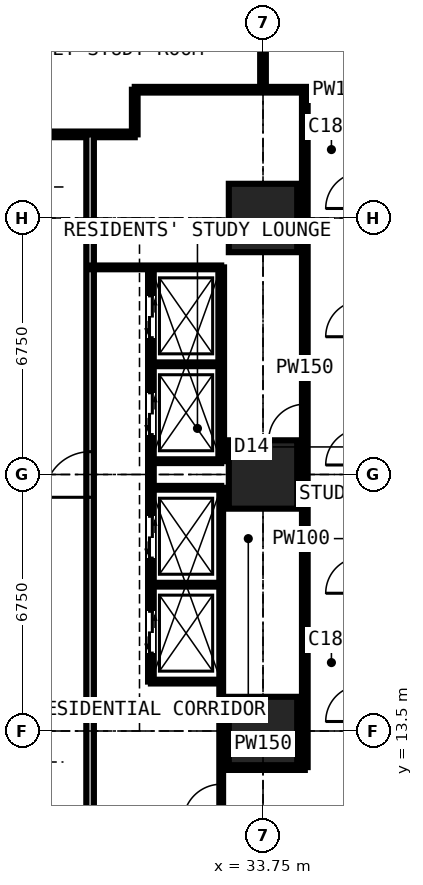
"""IFC4 building model, lengths in metres.
Left out: names, types, materials, properties, quantities, classifications, styles, units other than length and angle.
Written with IfcOpenShell. Run it as: python <this file> out.ifc"""

import sys

from ifc_helpers import new_model, si_unit, direction, frame, frame_2d, origin, origin_2d, place, context, subcontext, project, spatial, rectangle, extrude, element, fill, save


model = new_model("IFC4")
c1 = context("Model", 3, precision=1e-05, world=origin(), true_north=direction((0.0, 1.0)))
c2 = subcontext(c1, "Body", "Model", "MODEL_VIEW")
j1 = project(units=[si_unit("LENGTHUNIT", "METRE"), si_unit("PLANEANGLEUNIT", "RADIAN")], contexts=[c1])
p1 = place(None, origin())
s1 = spatial("IfcSite", under=j1, at=p1, CompositionType="ELEMENT")
p2 = place(p1, origin())
s2 = spatial("IfcBuilding", under=s1, at=p2, CompositionType="ELEMENT")
p3 = place(p2, frame((0.0, 0.0, 50.4)))
s3 = spatial("IfcBuildingStorey", under=s2, at=p3, CompositionType="ELEMENT", Elevation=50.4)
for number, where, z_axis, x_axis in (
    (1, (33.75, 13.5, 0.0), (0.0, 0.0, 1.0), (1.0, 0.0, 0.0)),
    (2, (33.75, 20.25, 0.0), (0.0, 0.0, 1.0), (1.0, 0.0, 0.0)),
    (3, (33.75, 27.0, 0.0), (0.0, 0.0, 1.0), (1.0, 0.0, 0.0)),
):
    element("IfcColumn", number, at=place(p3, frame(where, z_axis=z_axis, x_axis=x_axis)), inside=s3, PredefinedType="COLUMN", context=c2, shape_type="SweptSolid", body=[
        extrude(rectangle(XDim=1.8, YDim=1.8, at=origin_2d()), origin(), (0.0, 0.0, 1.0), 3.6),
    ])
p4 = place(p3, frame((11.3, 29.2, 0.0), z_axis=(0.0, 0.0, 1.0), x_axis=(1.0, 0.0, 0.0)))
e4 = element("IfcWall", 4, at=p4, inside=s3, PredefinedType="PARTITIONING", context=c2, shape_type="SweptSolid", body=[
    extrude(rectangle(XDim=19.075, YDim=0.15, at=frame_2d((9.538, 0.0))), origin(), (0.0, 0.0, 1.0), 3.375),
])
p5 = place(p4, frame((12.875, 0.0, 0.0)))
e5 = element("IfcOpeningElement", 5, at=p5, cuts=e4, PredefinedType="OPENING", context=c2, shape_type="SweptSolid", body=[
    extrude(rectangle(XDim=1.0, YDim=2.2, at=frame_2d((0.5, 1.1))), frame((0.0, 0.085, 0.0), z_axis=(0.0, -1.0, 0.0), x_axis=(1.0, 0.0, 0.0)), (0.0, 0.0, 1.0), 0.17),
])
p6 = place(p4, frame((10.438, 0.0, 0.0)))
e6 = element("IfcOpeningElement", 6, at=p6, cuts=e4, PredefinedType="OPENING", context=c2, shape_type="SweptSolid", body=[
    extrude(rectangle(XDim=1.0, YDim=2.2, at=frame_2d((0.5, 1.1))), frame((0.0, 0.085, 0.0), z_axis=(0.0, -1.0, 0.0), x_axis=(1.0, 0.0, 0.0)), (0.0, 0.0, 1.0), 0.17),
])
p7 = place(p4, frame((15.675, 0.0, 0.0)))
e7 = element("IfcOpeningElement", 7, at=p7, cuts=e4, PredefinedType="OPENING", context=c2, shape_type="SweptSolid", body=[
    extrude(rectangle(XDim=0.95, YDim=2.2, at=frame_2d((0.475, 1.1))), frame((0.0, 0.085, 0.0), z_axis=(0.0, -1.0, 0.0), x_axis=(1.0, 0.0, 0.0)), (0.0, 0.0, 1.0), 0.17),
])
p8 = place(p3, frame((29.2, 11.3, 0.0), z_axis=(0.0, 0.0, 1.0), x_axis=(0.0, 1.0, 0.0)))
e8 = element("IfcWall", 8, at=p8, inside=s3, PredefinedType="PARTITIONING", context=c2, shape_type="SweptSolid", body=[
    extrude(rectangle(XDim=17.9, YDim=0.2, at=frame_2d((8.95, 0.0))), origin(), (0.0, 0.0, 1.0), 3.375),
])
p9 = place(p8, frame((8.35, 0.0, 0.0)))
e9 = element("IfcOpeningElement", 9, at=p9, cuts=e8, PredefinedType="OPENING", context=c2, shape_type="SweptSolid", body=[
    extrude(rectangle(XDim=1.2, YDim=2.2, at=frame_2d((0.6, 1.1))), frame((0.0, 0.11, 0.0), z_axis=(0.0, -1.0, 0.0), x_axis=(1.0, 0.0, 0.0)), (0.0, 0.0, 1.0), 0.22),
])
p10 = place(p3, frame((29.2, 25.7, 0.0), z_axis=(0.0, 0.0, 1.0), x_axis=(1.0, 0.0, 0.0)))
e10 = element("IfcWall", 10, at=p10, inside=s3, PredefinedType="SHEAR", context=c2, shape_type="SweptSolid", body=[
    extrude(rectangle(XDim=3.45, YDim=0.1, at=frame_2d((1.725, 0.0))), origin(), (0.0, 0.0, 1.0), 3.375),
])
p11 = place(p3, frame((30.375, 29.2, 0.0), z_axis=(0.0, 0.0, 1.0), x_axis=(0.0, 1.0, 0.0)))
e11 = element("IfcWall", 11, at=p11, inside=s3, PredefinedType="PARTITIONING", context=c2, shape_type="SweptSolid", body=[
    extrude(rectangle(XDim=1.175, YDim=0.15, at=frame_2d((0.587, 0.0))), origin(), (0.0, 0.0, 1.0), 3.375),
])
p12 = place(p3, frame((30.375, 30.375, 0.0), z_axis=(0.0, 0.0, 1.0), x_axis=(1.0, 0.0, 0.0)))
e12 = element("IfcWall", 12, at=p12, inside=s3, PredefinedType="PARTITIONING", context=c2, shape_type="SweptSolid", body=[
    extrude(rectangle(XDim=10.859, YDim=0.15, at=frame_2d((5.429, 0.0))), origin(), (0.0, 0.0, 1.0), 3.375),
])
p13 = place(p3, frame((30.8, 14.8, 0.0), z_axis=(0.0, 0.0, 1.0), x_axis=(0.0, 1.0, 0.0)))
e13 = element("IfcWall", 13, at=p13, inside=s3, PredefinedType="PARTITIONING", context=c2, shape_type="SweptSolid", body=[
    extrude(rectangle(XDim=10.9, YDim=0.15, at=frame_2d((5.45, 0.0))), origin(), (0.0, 0.0, 1.0), 3.375),
])
p14 = place(p13, frame((0.75, 0.0, 0.0)))
e14 = element("IfcOpeningElement", 14, at=p14, cuts=e13, PredefinedType="OPENING", context=c2, shape_type="SweptSolid", body=[
    extrude(rectangle(XDim=1.1, YDim=2.2, at=frame_2d((0.55, 1.1))), frame((0.0, 0.085, 0.0), z_axis=(0.0, -1.0, 0.0), x_axis=(1.0, 0.0, 0.0)), (0.0, 0.0, 1.0), 0.17),
])
p15 = place(p13, frame((3.25, 0.0, 0.0)))
e15 = element("IfcOpeningElement", 15, at=p15, cuts=e13, PredefinedType="OPENING", context=c2, shape_type="SweptSolid", body=[
    extrude(rectangle(XDim=1.1, YDim=2.2, at=frame_2d((0.55, 1.1))), frame((0.0, 0.085, 0.0), z_axis=(0.0, -1.0, 0.0), x_axis=(1.0, 0.0, 0.0)), (0.0, 0.0, 1.0), 0.17),
])
p16 = place(p13, frame((6.5, 0.0, 0.0)))
e16 = element("IfcOpeningElement", 16, at=p16, cuts=e13, PredefinedType="OPENING", context=c2, shape_type="SweptSolid", body=[
    extrude(rectangle(XDim=1.1, YDim=2.2, at=frame_2d((0.55, 1.1))), frame((0.0, 0.085, 0.0), z_axis=(0.0, -1.0, 0.0), x_axis=(1.0, 0.0, 0.0)), (0.0, 0.0, 1.0), 0.17),
])
p17 = place(p13, frame((9.05, 0.0, 0.0)))
e17 = element("IfcOpeningElement", 17, at=p17, cuts=e13, PredefinedType="OPENING", context=c2, shape_type="SweptSolid", body=[
    extrude(rectangle(XDim=1.1, YDim=2.2, at=frame_2d((0.55, 1.1))), frame((0.0, 0.085, 0.0), z_axis=(0.0, -1.0, 0.0), x_axis=(1.0, 0.0, 0.0)), (0.0, 0.0, 1.0), 0.17),
])
for number, where, z_axis, x_axis in (
    (18, (30.8, 14.8, 0.0), (0.0, 0.0, 1.0), (1.0, 0.0, 0.0)),
    (19, (30.8, 17.35, 0.0), (0.0, 0.0, 1.0), (1.0, 0.0, 0.0)),
    (20, (30.8, 19.9, 0.0), (0.0, 0.0, 1.0), (1.0, 0.0, 0.0)),
    (21, (30.8, 20.6, 0.0), (0.0, 0.0, 1.0), (1.0, 0.0, 0.0)),
    (22, (30.8, 23.15, 0.0), (0.0, 0.0, 1.0), (1.0, 0.0, 0.0)),
):
    element("IfcWall", number, at=place(p3, frame(where, z_axis=z_axis, x_axis=x_axis)), inside=s3, PredefinedType="SHEAR", context=c2, shape_type="SweptSolid", body=[
        extrude(rectangle(XDim=1.85, YDim=0.1, at=frame_2d((0.925, 0.0))), origin(), (0.0, 0.0, 1.0), 3.375),
    ])
p18 = place(p3, frame((32.65, 10.6, 0.0), z_axis=(0.0, 0.0, 1.0), x_axis=(0.0, 1.0, 0.0)))
e23 = element("IfcWall", 23, at=p18, inside=s3, PredefinedType="SHEAR", context=c2, shape_type="SweptSolid", body=[
    extrude(rectangle(XDim=9.3, YDim=0.1, at=frame_2d((4.65, 0.0))), origin(), (0.0, 0.0, 1.0), 3.375),
])
p19 = place(p18, frame((0.5, 0.0, 0.0)))
e24 = element("IfcOpeningElement", 24, at=p19, cuts=e23, PredefinedType="OPENING", context=c2, shape_type="SweptSolid", body=[
    extrude(rectangle(XDim=1.0, YDim=2.2, at=frame_2d((0.5, 1.1))), frame((0.0, 0.06, 0.0), z_axis=(0.0, -1.0, 0.0), x_axis=(1.0, 0.0, 0.0)), (0.0, 0.0, 1.0), 0.12),
])
p20 = place(p3, frame((32.65, 12.55, 0.0), z_axis=(0.0, 0.0, 1.0), x_axis=(1.0, 0.0, 0.0)))
e25 = element("IfcWall", 25, at=p20, inside=s3, PredefinedType="PARTITIONING", context=c2, shape_type="SweptSolid", body=[
    extrude(rectangle(XDim=2.2, YDim=0.15, at=frame_2d((1.1, 0.0))), origin(), (0.0, 0.0, 1.0), 3.375),
])
p21 = place(p3, frame((32.65, 20.6, 0.0), z_axis=(0.0, 0.0, 1.0), x_axis=(0.0, 1.0, 0.0)))
e26 = element("IfcWall", 26, at=p21, inside=s3, PredefinedType="PARTITIONING", context=c2, shape_type="SweptSolid", body=[
    extrude(rectangle(XDim=5.1, YDim=0.15, at=frame_2d((2.55, 0.0))), origin(), (0.0, 0.0, 1.0), 3.375),
])
p22 = place(p3, frame((33.75, 30.375, 0.0), z_axis=(0.0, 0.0, 1.0), x_axis=(0.0, 1.0, 0.0)))
e27 = element("IfcWall", 27, at=p22, inside=s3, PredefinedType="PARTITIONING", context=c2, shape_type="SweptSolid", body=[
    extrude(rectangle(XDim=5.975, YDim=0.15, at=frame_2d((2.988, 0.0))), origin(), (0.0, 0.0, 1.0), 2.877),
])
p23 = place(p3, frame((34.85, 12.55, 0.0), z_axis=(0.0, 0.0, 1.0), x_axis=(0.0, 1.0, 0.0)))
e28 = element("IfcWall", 28, at=p23, inside=s3, PredefinedType="PARTITIONING", context=c2, shape_type="SweptSolid", body=[
    extrude(rectangle(XDim=17.825, YDim=0.15, at=frame_2d((8.913, 0.0))), origin(), (0.0, 0.0, 1.0), 3.375),
])
p24 = place(p23, frame((8.6, 0.0, 0.0)))
e29 = element("IfcOpeningElement", 29, at=p24, cuts=e28, PredefinedType="OPENING", context=c2, shape_type="SweptSolid", body=[
    extrude(rectangle(XDim=0.95, YDim=2.2, at=frame_2d((0.475, 1.1))), frame((0.0, 0.085, 0.0), z_axis=(0.0, -1.0, 0.0), x_axis=(1.0, 0.0, 0.0)), (0.0, 0.0, 1.0), 0.17),
])
p25 = place(p19, origin())
e30 = element("IfcDoor", 30, at=p25, inside=s3, OperationType="SINGLE_SWING_LEFT", PredefinedType="DOOR", context=c2, shape_type="SweptSolid", body=[
    extrude(rectangle(XDim=1.0, YDim=2.2, at=frame_2d((0.5, 1.1))), frame((0.0, 0.025, 0.0), z_axis=(0.0, -1.0, 0.0), x_axis=(1.0, 0.0, 0.0)), (0.0, 0.0, 1.0), 0.05),
])
fill(e24, e30)
p26 = place(p24, origin())
e31 = element("IfcDoor", 31, at=p26, inside=s3, OperationType="SINGLE_SWING_LEFT", PredefinedType="DOOR", context=c2, shape_type="SweptSolid", body=[
    extrude(rectangle(XDim=0.95, YDim=2.2, at=frame_2d((0.475, 1.1))), frame((0.0, 0.025, 0.0), z_axis=(0.0, -1.0, 0.0), x_axis=(1.0, 0.0, 0.0)), (0.0, 0.0, 1.0), 0.05),
])
fill(e29, e31)
p27 = place(p14, origin())
e32 = element("IfcDoor", 32, at=p27, inside=s3, OperationType="DOUBLE_DOOR_SLIDING", PredefinedType="DOOR", context=c2, shape_type="SweptSolid", body=[
    extrude(rectangle(XDim=1.1, YDim=2.2, at=frame_2d((0.55, 1.1))), frame((0.0, 0.025, 0.0), z_axis=(0.0, -1.0, 0.0), x_axis=(1.0, 0.0, 0.0)), (0.0, 0.0, 1.0), 0.05),
])
fill(e14, e32)
p28 = place(p15, origin())
e33 = element("IfcDoor", 33, at=p28, inside=s3, OperationType="DOUBLE_DOOR_SLIDING", PredefinedType="DOOR", context=c2, shape_type="SweptSolid", body=[
    extrude(rectangle(XDim=1.1, YDim=2.2, at=frame_2d((0.55, 1.1))), frame((0.0, 0.025, 0.0), z_axis=(0.0, -1.0, 0.0), x_axis=(1.0, 0.0, 0.0)), (0.0, 0.0, 1.0), 0.05),
])
fill(e15, e33)
p29 = place(p16, origin())
e34 = element("IfcDoor", 34, at=p29, inside=s3, OperationType="DOUBLE_DOOR_SLIDING", PredefinedType="DOOR", context=c2, shape_type="SweptSolid", body=[
    extrude(rectangle(XDim=1.1, YDim=2.2, at=frame_2d((0.55, 1.1))), frame((0.0, 0.025, 0.0), z_axis=(0.0, -1.0, 0.0), x_axis=(1.0, 0.0, 0.0)), (0.0, 0.0, 1.0), 0.05),
])
fill(e16, e34)
p30 = place(p17, origin())
e35 = element("IfcDoor", 35, at=p30, inside=s3, OperationType="DOUBLE_DOOR_SLIDING", PredefinedType="DOOR", context=c2, shape_type="SweptSolid", body=[
    extrude(rectangle(XDim=1.1, YDim=2.2, at=frame_2d((0.55, 1.1))), frame((0.0, 0.025, 0.0), z_axis=(0.0, -1.0, 0.0), x_axis=(1.0, 0.0, 0.0)), (0.0, 0.0, 1.0), 0.05),
])
fill(e17, e35)
p31 = place(p9, origin())
e36 = element("IfcDoor", 36, at=p31, inside=s3, OperationType="DOUBLE_DOOR_SINGLE_SWING", PredefinedType="DOOR", context=c2, shape_type="SweptSolid", body=[
    extrude(rectangle(XDim=1.2, YDim=2.2, at=frame_2d((0.6, 1.1))), frame((0.0, 0.025, 0.0), z_axis=(0.0, -1.0, 0.0), x_axis=(1.0, 0.0, 0.0)), (0.0, 0.0, 1.0), 0.05),
])
fill(e9, e36)
save(model, sys.argv[1])
